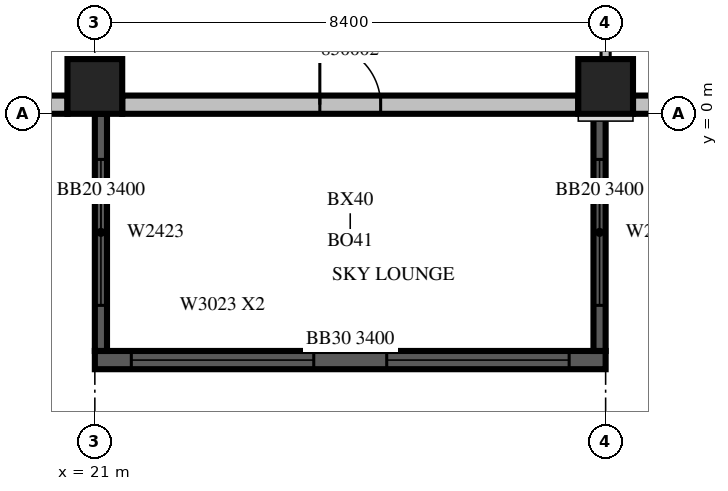
"""IFC4 building model, lengths in metres.
Left out: names, types, materials, properties, quantities, classifications, styles, units other than length and angle.
Written with IfcOpenShell. Run it as: python <this file> out.ifc"""

import sys

from ifc_helpers import new_model, si_unit, direction, frame, frame_2d, origin, origin_2d, place, context, subcontext, project, spatial, rectangle, extrude, source, transform, mapped, element, fill, save


model = new_model("IFC4")
c1 = context("Model", 3, precision=1e-05, world=origin(), true_north=direction((0.0, 1.0)))
c2 = subcontext(c1, "Body", "Model", "MODEL_VIEW")
j1 = project(units=[si_unit("LENGTHUNIT", "METRE"), si_unit("PLANEANGLEUNIT", "RADIAN")], contexts=[c1])
p1 = place(None, origin())
s1 = spatial("IfcSite", under=j1, at=p1, CompositionType="ELEMENT")
p2 = place(p1, origin())
s2 = spatial("IfcBuilding", under=s1, at=p2, CompositionType="ELEMENT")
p3 = place(p2, frame((0.0, 0.0, 223.4)))
s3 = spatial("IfcBuildingStorey", under=s2, at=p3, CompositionType="ELEMENT", Elevation=223.4)
m1 = source(origin(), c2, "Body", "SweptSolid", [
    extrude(rectangle(XDim=0.9, YDim=0.9, at=origin_2d()), origin(), (0.0, 0.0, 1.0), 3.8),
])
for number, where, z_axis, x_axis in (
    (1, (21.0, 0.45, 0.0), (0.0, 0.0, 1.0), (1.0, 0.0, 0.0)),
    (2, (29.4, 0.45, 0.0), (0.0, 0.0, 1.0), (1.0, 0.0, 0.0)),
):
    element("IfcColumn", number, at=place(p3, frame(where, z_axis=z_axis, x_axis=x_axis)), inside=s3, PredefinedType="COLUMN", context=c2, shape_type="MappedRepresentation", body=[
        mapped(m1, transform((0.0, 0.0, 0.0), scale=1.0)),
    ])
p4 = place(p3, frame((21.0, -4.05, 0.0), z_axis=(0.0, 0.0, 1.0), x_axis=(1.0, 0.0, 0.0)))
e3 = element("IfcWall", 3, at=p4, inside=s3, PredefinedType="SOLIDWALL", context=c2, shape_type="SweptSolid", body=[
    extrude(rectangle(XDim=8.4, YDim=0.3, at=frame_2d((4.2, 0.0))), origin(), (0.0, 0.0, 1.0), 3.4),
])
m2 = source(origin(), c2, "Body", "SweptSolid", [
    extrude(rectangle(XDim=3.0, YDim=2.3, at=frame_2d((1.5, 1.15))), frame((0.0, 0.16, 0.0), z_axis=(0.0, -1.0, 0.0), x_axis=(1.0, 0.0, 0.0)), (0.0, 0.0, 1.0), 0.32),
])
p5 = place(p4, frame((0.6, 0.0, 0.6)))
e4 = element("IfcOpeningElement", 4, at=p5, cuts=e3, PredefinedType="OPENING", context=c2, shape_type="MappedRepresentation", body=[
    mapped(m2, transform((0.0, 0.0, 0.0), scale=1.0)),
])
p6 = place(p4, frame((4.8, 0.0, 0.6)))
e5 = element("IfcOpeningElement", 5, at=p6, cuts=e3, PredefinedType="OPENING", context=c2, shape_type="MappedRepresentation", body=[
    mapped(m2, transform((0.0, 0.0, 0.0), scale=1.0)),
])
m3 = source(origin(), c2, "Body", "SweptSolid", [
    extrude(rectangle(XDim=3.9, YDim=0.2, at=frame_2d((1.95, 0.0))), origin(), (0.0, 0.0, 1.0), 3.4),
])
p7 = place(p3, frame((21.1, 0.0, 0.0), z_axis=(0.0, 0.0, 1.0), x_axis=(0.0, -1.0, 0.0)))
e6 = element("IfcWall", 6, at=p7, inside=s3, PredefinedType="SOLIDWALL", context=c2, shape_type="MappedRepresentation", body=[
    mapped(m3, transform((0.0, 0.0, 0.0), scale=1.0)),
])
m4 = source(origin(), c2, "Body", "SweptSolid", [
    extrude(rectangle(XDim=2.4, YDim=2.3, at=frame_2d((1.2, 1.15))), frame((0.0, 0.11, 0.0), z_axis=(0.0, -1.0, 0.0), x_axis=(1.0, 0.0, 0.0)), (0.0, 0.0, 1.0), 0.22),
])
p8 = place(p7, frame((0.75, 0.0, 0.6)))
e7 = element("IfcOpeningElement", 7, at=p8, cuts=e6, PredefinedType="OPENING", context=c2, shape_type="MappedRepresentation", body=[
    mapped(m4, transform((0.0, 0.0, 0.0), scale=1.0)),
])
p9 = place(p3, frame((29.3, 0.0, 0.0), z_axis=(0.0, 0.0, 1.0), x_axis=(0.0, -1.0, 0.0)))
e8 = element("IfcWall", 8, at=p9, inside=s3, PredefinedType="SOLIDWALL", context=c2, shape_type="MappedRepresentation", body=[
    mapped(m3, transform((0.0, 0.0, 0.0), scale=1.0)),
])
p10 = place(p9, frame((0.75, 0.0, 0.6)))
e9 = element("IfcOpeningElement", 9, at=p10, cuts=e8, PredefinedType="OPENING", context=c2, shape_type="MappedRepresentation", body=[
    mapped(m4, transform((0.0, 0.0, 0.0), scale=1.0)),
])
m5 = source(origin(), c2, "Body", "SweptSolid", [
    extrude(rectangle(XDim=9.6, YDim=0.3, at=frame_2d((4.8, 0.0))), origin(), (0.0, 0.0, 1.0), 3.4),
])
p11 = place(p3, frame((10.95, 0.15, 0.0), z_axis=(0.0, 0.0, 1.0), x_axis=(1.0, 0.0, 0.0)))
e10 = element("IfcWall", 10, at=p11, inside=s3, PredefinedType="STANDARD", context=c2, shape_type="MappedRepresentation", body=[
    mapped(m5, transform((0.0, 0.0, 0.0), scale=1.0)),
])
m6 = source(origin(), c2, "Body", "SweptSolid", [
    extrude(rectangle(XDim=3.6, YDim=2.3, at=frame_2d((1.8, 1.15))), frame((0.0, 0.16, 0.0), z_axis=(0.0, -1.0, 0.0), x_axis=(1.0, 0.0, 0.0)), (0.0, 0.0, 1.0), 0.32),
])
p12 = place(p11, frame((5.625, 0.0, 0.6)))
e11 = element("IfcOpeningElement", 11, at=p12, cuts=e10, PredefinedType="OPENING", context=c2, shape_type="MappedRepresentation", body=[
    mapped(m6, transform((0.0, 0.0, 0.0), scale=1.0)),
])
m7 = source(origin(), c2, "Body", "SweptSolid", [
    extrude(rectangle(XDim=1.0, YDim=2.1, at=frame_2d((0.5, 1.05))), frame((0.0, 0.16, 0.0), z_axis=(0.0, -1.0, 0.0), x_axis=(1.0, 0.0, 0.0)), (0.0, 0.0, 1.0), 0.32),
])
p13 = place(p11, frame((1.675, 0.0, 0.0)))
e12 = element("IfcOpeningElement", 12, at=p13, cuts=e10, PredefinedType="OPENING", context=c2, shape_type="MappedRepresentation", body=[
    mapped(m7, transform((0.0, 0.0, 0.0), scale=1.0)),
])
m8 = source(origin(), c2, "Body", "SweptSolid", [
    extrude(rectangle(XDim=7.5, YDim=0.3, at=frame_2d((3.75, 0.0))), origin(), (0.0, 0.0, 1.0), 3.4),
])
p14 = place(p3, frame((21.45, 0.15, 0.0), z_axis=(0.0, 0.0, 1.0), x_axis=(1.0, 0.0, 0.0)))
e13 = element("IfcWall", 13, at=p14, inside=s3, PredefinedType="STANDARD", context=c2, shape_type="MappedRepresentation", body=[
    mapped(m8, transform((0.0, 0.0, 0.0), scale=1.0)),
])
p15 = place(p14, frame((3.25, 0.0, 0.0)))
e14 = element("IfcOpeningElement", 14, at=p15, cuts=e13, PredefinedType="OPENING", context=c2, shape_type="MappedRepresentation", body=[
    mapped(m7, transform((0.0, 0.0, 0.0), scale=1.0)),
])
p16 = place(p3, frame((29.85, 0.15, 0.0), z_axis=(0.0, 0.0, 1.0), x_axis=(1.0, 0.0, 0.0)))
e15 = element("IfcWall", 15, at=p16, inside=s3, PredefinedType="STANDARD", context=c2, shape_type="MappedRepresentation", body=[
    mapped(m8, transform((0.0, 0.0, 0.0), scale=1.0)),
])
m9 = source(origin(), c2, "Body", "SweptSolid", [
    extrude(rectangle(XDim=1.2, YDim=2.3, at=frame_2d((0.6, 1.15))), frame((0.0, 0.16, 0.0), z_axis=(0.0, -1.0, 0.0), x_axis=(1.0, 0.0, 0.0)), (0.0, 0.0, 1.0), 0.32),
])
p17 = place(p16, frame((0.438, 0.0, 0.6)))
e16 = element("IfcOpeningElement", 16, at=p17, cuts=e15, PredefinedType="OPENING", context=c2, shape_type="MappedRepresentation", body=[
    mapped(m9, transform((0.0, 0.0, 0.0), scale=1.0)),
])
p18 = place(p16, frame((5.963, 0.0, 0.6)))
e17 = element("IfcOpeningElement", 17, at=p18, cuts=e15, PredefinedType="OPENING", context=c2, shape_type="MappedRepresentation", body=[
    mapped(m9, transform((0.0, 0.0, 0.0), scale=1.0)),
])
m10 = source(origin(), c2, "Body", "SweptSolid", [
    extrude(rectangle(XDim=2.556, YDim=0.15, at=frame_2d((1.278, 0.0))), origin(), (0.0, 0.0, 1.0), 3.4),
])
p19 = place(p3, frame((29.4, 0.899, 0.0), z_axis=(0.0, 0.0, 1.0), x_axis=(0.0, 1.0, 0.0)))
e18 = element("IfcWall", 18, at=p19, inside=s3, PredefinedType="PARTITIONING", context=c2, shape_type="MappedRepresentation", body=[
    mapped(m10, transform((0.0, 0.0, 0.0), scale=1.0)),
])
m11 = source(origin(), c2, "Body", "SweptSolid", [
    extrude(rectangle(XDim=3.0, YDim=2.3, at=frame_2d((1.5, 1.15))), frame((0.0, 0.03, 0.0), z_axis=(0.0, -1.0, 0.0), x_axis=(1.0, 0.0, 0.0)), (0.0, 0.0, 1.0), 0.06),
])
p20 = place(p5, origin())
e19 = element("IfcWindow", 19, at=p20, inside=s3, PartitioningType="SINGLE_PANEL", PredefinedType="WINDOW", context=c2, shape_type="MappedRepresentation", body=[
    mapped(m11, transform((0.0, 0.0, 0.0), scale=1.0)),
])
fill(e4, e19)
p21 = place(p6, origin())
e20 = element("IfcWindow", 20, at=p21, inside=s3, PartitioningType="SINGLE_PANEL", PredefinedType="WINDOW", context=c2, shape_type="MappedRepresentation", body=[
    mapped(m11, transform((0.0, 0.0, 0.0), scale=1.0)),
])
fill(e5, e20)
m12 = source(origin(), c2, "Body", "SweptSolid", [
    extrude(rectangle(XDim=2.4, YDim=2.3, at=frame_2d((1.2, 1.15))), frame((0.0, 0.03, 0.0), z_axis=(0.0, -1.0, 0.0), x_axis=(1.0, 0.0, 0.0)), (0.0, 0.0, 1.0), 0.06),
])
p22 = place(p8, origin())
e21 = element("IfcWindow", 21, at=p22, inside=s3, PartitioningType="SINGLE_PANEL", PredefinedType="WINDOW", context=c2, shape_type="MappedRepresentation", body=[
    mapped(m12, transform((0.0, 0.0, 0.0), scale=1.0)),
])
fill(e7, e21)
p23 = place(p10, origin())
e22 = element("IfcWindow", 22, at=p23, inside=s3, PartitioningType="SINGLE_PANEL", PredefinedType="WINDOW", context=c2, shape_type="MappedRepresentation", body=[
    mapped(m12, transform((0.0, 0.0, 0.0), scale=1.0)),
])
fill(e9, e22)
m13 = source(origin(), c2, "Body", "SweptSolid", [
    extrude(rectangle(XDim=1.0, YDim=2.1, at=frame_2d((0.5, 1.05))), frame((0.0, 0.025, 0.0), z_axis=(0.0, -1.0, 0.0), x_axis=(1.0, 0.0, 0.0)), (0.0, 0.0, 1.0), 0.05),
])
p24 = place(p15, origin())
e23 = element("IfcDoor", 23, at=p24, inside=s3, OperationType="SINGLE_SWING_LEFT", PredefinedType="DOOR", context=c2, shape_type="MappedRepresentation", body=[
    mapped(m13, transform((0.0, 0.0, 0.0), scale=1.0)),
])
fill(e14, e23)
save(model, sys.argv[1])
